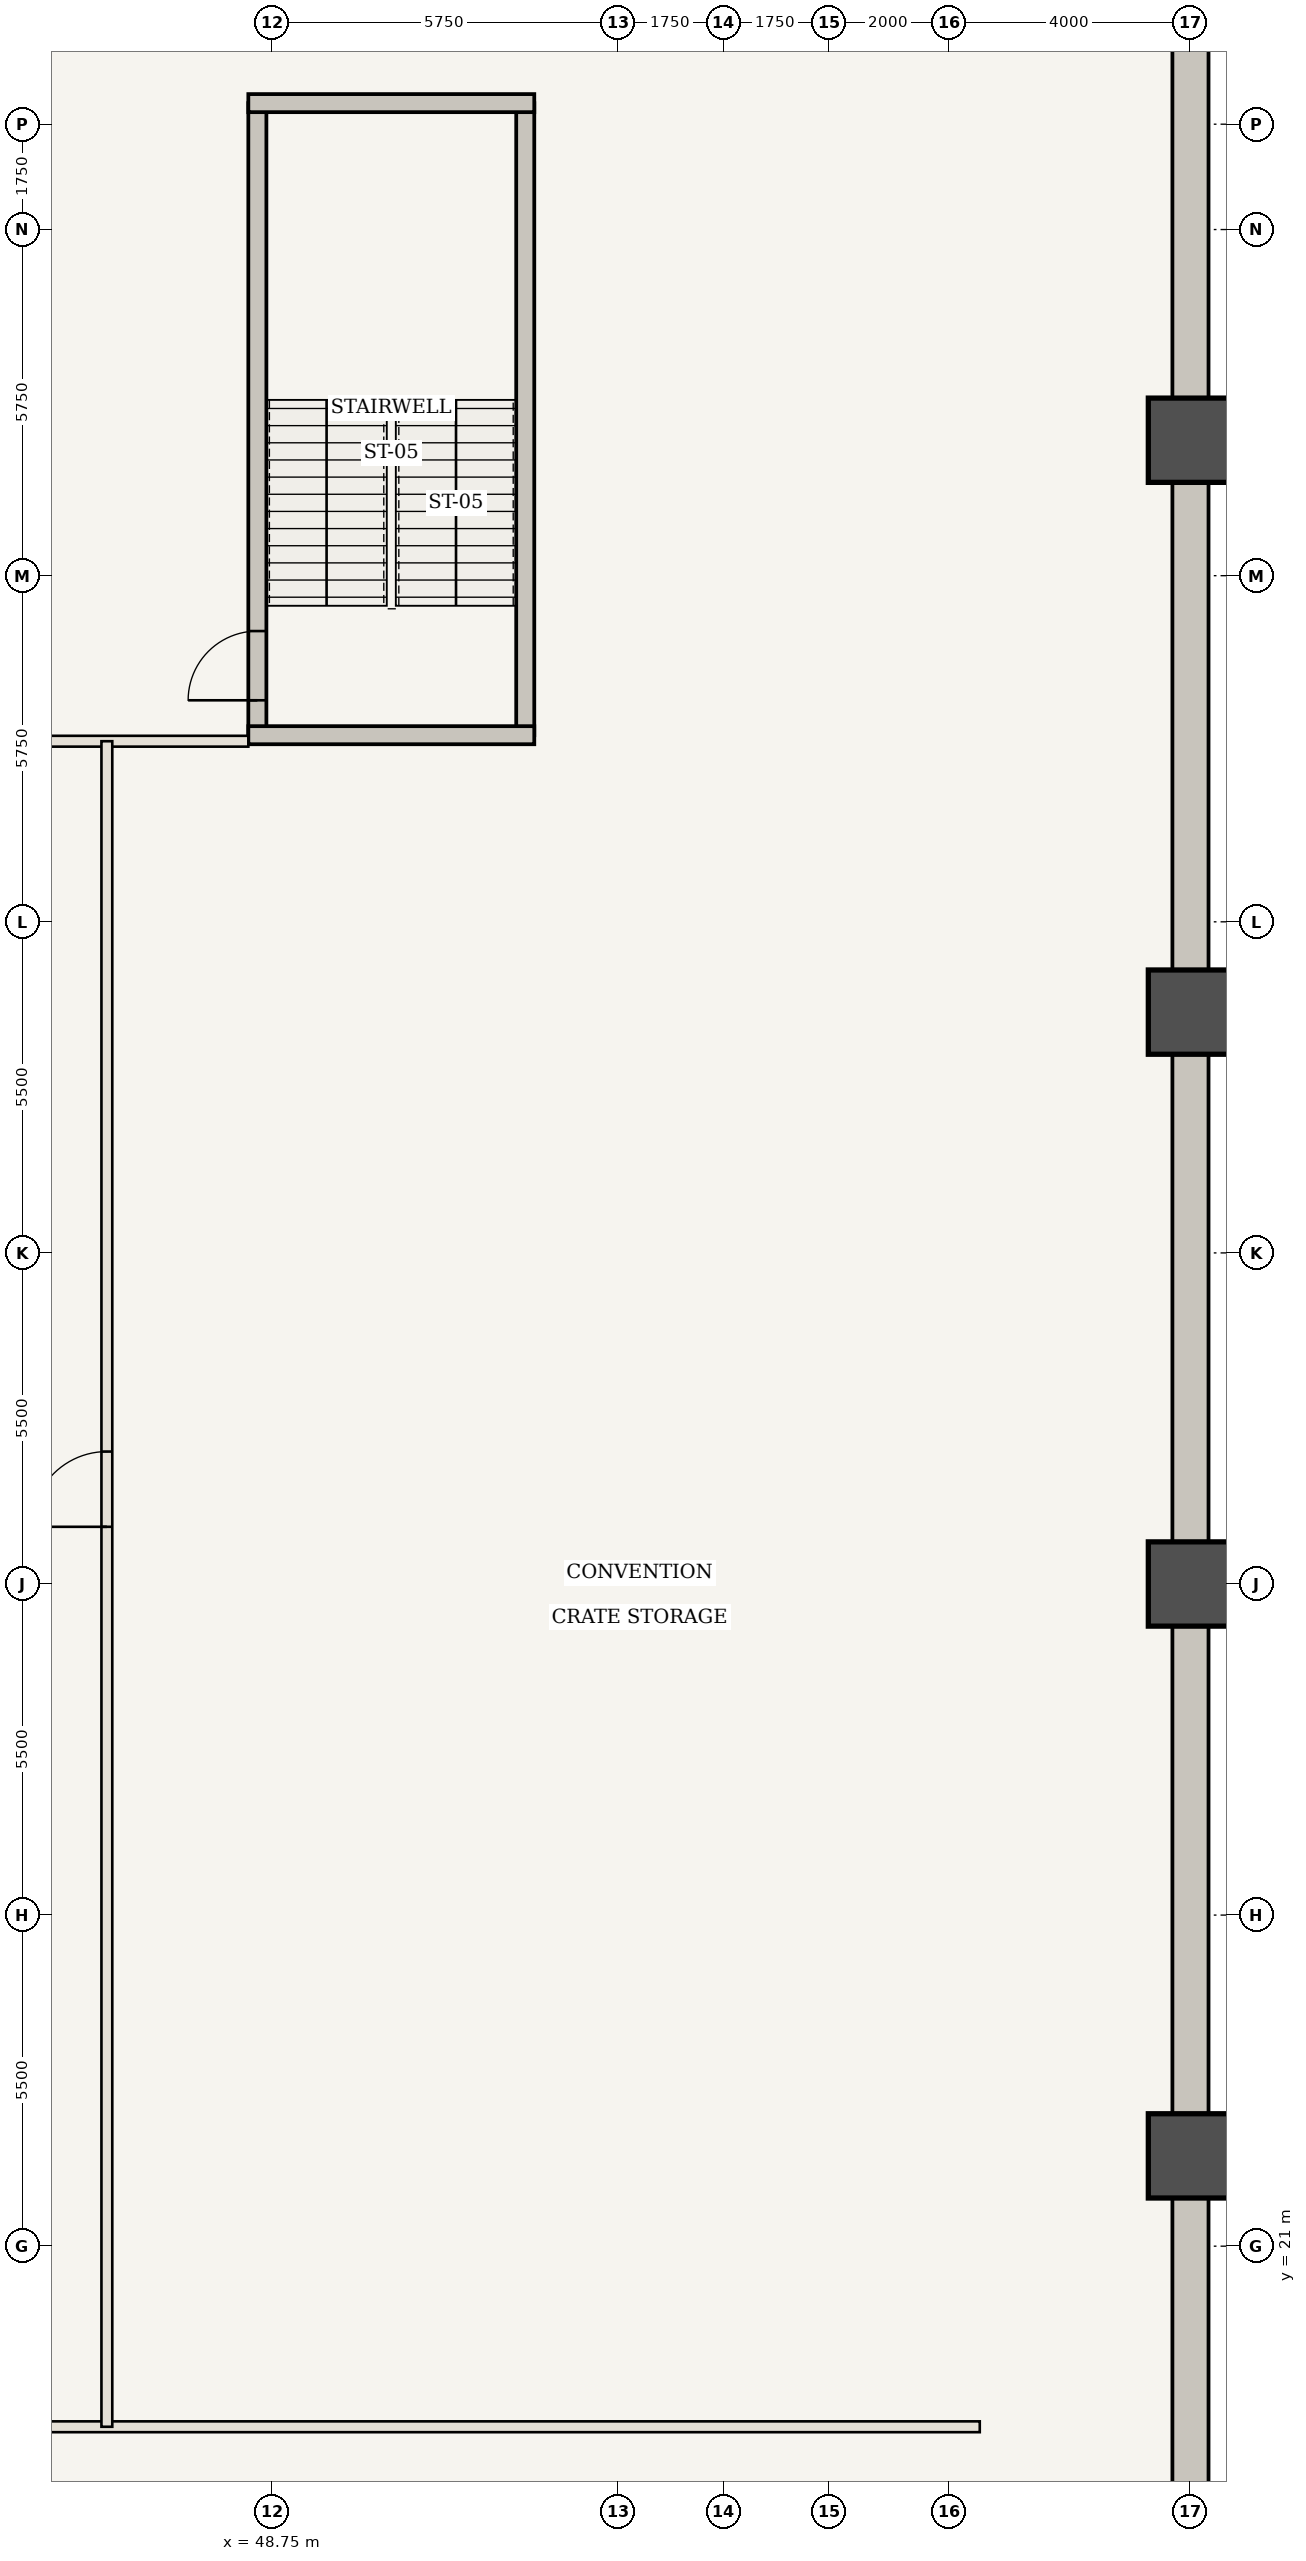
"""IFC4 building model, lengths in metres.
Left out: names, types, materials, properties, quantities, classifications, styles, units other than length and angle.
Written with IfcOpenShell. Run it as: python <this file> out.ifc"""

import sys

from ifc_helpers import new_model, si_unit, direction, frame, frame_2d, origin, origin_2d, place, context, subcontext, project, spatial, rectangle, extrude, element, fill, save


model = new_model("IFC4")
c1 = context("Model", 3, precision=1e-05, world=origin(), true_north=direction((0.0, 1.0)))
c2 = subcontext(c1, "Body", "Model", "MODEL_VIEW")
j1 = project(units=[si_unit("LENGTHUNIT", "METRE"), si_unit("PLANEANGLEUNIT", "RADIAN")], contexts=[c1])
p1 = place(None, origin())
s1 = spatial("IfcSite", under=j1, at=p1, CompositionType="ELEMENT")
p2 = place(p1, origin())
s2 = spatial("IfcBuilding", under=s1, at=p2, CompositionType="ELEMENT")
p3 = place(p2, frame((0.0, 0.0, -9.1)))
s3 = spatial("IfcBuildingStorey", under=s2, at=p3, CompositionType="ELEMENT", Elevation=-9.1)
p4 = place(p3, frame((64.0, 3.5, -0.6), z_axis=(0.0, 0.0, 1.0), x_axis=(0.0, 1.0, 0.0)))
e1 = element("IfcWall", 1, at=p4, inside=s3, PredefinedType="USERDEFINED", context=c2, shape_type="SweptSolid", body=[
    extrude(rectangle(XDim=57.0, YDim=0.6, at=frame_2d((28.5, 0.0))), origin(), (0.0, 0.0, 1.0), 5.15),
])
for number, where, z_axis, x_axis in (
    (2, (64.0, 22.5, -0.6), (0.0, 0.0, 1.0), (1.0, 0.0, 0.0)),
    (3, (64.0, 32.0, -0.6), (0.0, 0.0, 1.0), (1.0, 0.0, 0.0)),
    (4, (64.0, 41.5, -0.6), (0.0, 0.0, 1.0), (1.0, 0.0, 0.0)),
    (5, (64.0, 51.0, -0.6), (0.0, 0.0, 1.0), (1.0, 0.0, 0.0)),
):
    element("IfcColumn", number, at=place(p3, frame(where, z_axis=z_axis, x_axis=x_axis)), inside=s3, PredefinedType="COLUMN", context=c2, shape_type="SweptSolid", body=[
        extrude(rectangle(XDim=1.4, YDim=1.4, at=origin_2d()), origin(), (0.0, 0.0, 1.0), 5.15),
    ])
p5 = place(p3, frame((48.5, 46.1, 0.0), z_axis=(0.0, 0.0, 1.0), x_axis=(0.0, 1.0, 0.0)))
e6 = element("IfcWall", 6, at=p5, inside=s3, PredefinedType="SHEAR", context=c2, shape_type="SweptSolid", body=[
    extrude(rectangle(XDim=10.5, YDim=0.3, at=frame_2d((5.25, 0.0))), origin(), (0.0, 0.0, 1.0), 4.25),
])
p6 = place(p5, frame((0.58, 0.0, 0.0)))
e7 = element("IfcOpeningElement", 7, at=p6, cuts=e6, PredefinedType="OPENING", context=c2, shape_type="SweptSolid", body=[
    extrude(rectangle(XDim=1.15, YDim=2.15, at=frame_2d((0.575, 1.075))), frame((0.0, 0.16, 0.0), z_axis=(0.0, -1.0, 0.0), x_axis=(1.0, 0.0, 0.0)), (0.0, 0.0, 1.0), 0.32),
])
p7 = place(p3, frame((52.95, 46.1, 0.0), z_axis=(0.0, 0.0, 1.0), x_axis=(0.0, 1.0, 0.0)))
e8 = element("IfcWall", 8, at=p7, inside=s3, PredefinedType="SHEAR", context=c2, shape_type="SweptSolid", body=[
    extrude(rectangle(XDim=10.5, YDim=0.3, at=frame_2d((5.25, 0.0))), origin(), (0.0, 0.0, 1.0), 4.25),
])
for number, where, z_axis, x_axis in (
    (9, (48.35, 46.1, 0.0), (0.0, 0.0, 1.0), (1.0, 0.0, 0.0)),
    (10, (48.35, 56.6, 0.0), (0.0, 0.0, 1.0), (1.0, 0.0, 0.0)),
):
    element("IfcWall", number, at=place(p3, frame(where, z_axis=z_axis, x_axis=x_axis)), inside=s3, PredefinedType="SHEAR", context=c2, shape_type="SweptSolid", body=[
        extrude(rectangle(XDim=4.75, YDim=0.3, at=frame_2d((2.375, 0.0))), origin(), (0.0, 0.0, 1.0), 4.25),
    ])
p8 = place(p3, frame((38.0, 18.0, 0.0), z_axis=(0.0, 0.0, 1.0), x_axis=(1.0, 0.0, 0.0)))
e11 = element("IfcWall", 11, at=p8, inside=s3, PredefinedType="STANDARD", context=c2, shape_type="SweptSolid", body=[
    extrude(rectangle(XDim=22.5, YDim=0.18, at=frame_2d((11.25, 0.0))), origin(), (0.0, 0.0, 1.0), 4.25),
])
p9 = place(p8, frame((0.85, 0.0, 0.0)))
e12 = element("IfcOpeningElement", 12, at=p9, cuts=e11, PredefinedType="OPENING", context=c2, shape_type="SweptSolid", body=[
    extrude(rectangle(XDim=1.25, YDim=2.2, at=frame_2d((0.625, 1.1))), frame((0.0, 0.1, 0.0), z_axis=(0.0, -1.0, 0.0), x_axis=(1.0, 0.0, 0.0)), (0.0, 0.0, 1.0), 0.2),
])
p10 = place(p3, frame((26.0, 46.0, 0.0), z_axis=(0.0, 0.0, 1.0), x_axis=(1.0, 0.0, 0.0)))
e13 = element("IfcWall", 13, at=p10, inside=s3, PredefinedType="STANDARD", context=c2, shape_type="SweptSolid", body=[
    extrude(rectangle(XDim=22.35, YDim=0.18, at=frame_2d((11.175, 0.0))), origin(), (0.0, 0.0, 1.0), 4.25),
])
p11 = place(p10, frame((0.85, 0.0, 0.0)))
e14 = element("IfcOpeningElement", 14, at=p11, cuts=e13, PredefinedType="OPENING", context=c2, shape_type="SweptSolid", body=[
    extrude(rectangle(XDim=1.25, YDim=2.2, at=frame_2d((0.625, 1.1))), frame((0.0, 0.1, 0.0), z_axis=(0.0, -1.0, 0.0), x_axis=(1.0, 0.0, 0.0)), (0.0, 0.0, 1.0), 0.2),
])
p12 = place(p3, frame((46.0, 18.0, 0.0), z_axis=(0.0, 0.0, 1.0), x_axis=(0.0, 1.0, 0.0)))
e15 = element("IfcWall", 15, at=p12, inside=s3, PredefinedType="STANDARD", context=c2, shape_type="SweptSolid", body=[
    extrude(rectangle(XDim=28.0, YDim=0.18, at=frame_2d((14.0, 0.0))), origin(), (0.0, 0.0, 1.0), 4.25),
])
p13 = place(p12, frame((14.95, 0.0, 0.0)))
e16 = element("IfcOpeningElement", 16, at=p13, cuts=e15, PredefinedType="OPENING", context=c2, shape_type="SweptSolid", body=[
    extrude(rectangle(XDim=1.25, YDim=2.2, at=frame_2d((0.625, 1.1))), frame((0.0, 0.1, 0.0), z_axis=(0.0, -1.0, 0.0), x_axis=(1.0, 0.0, 0.0)), (0.0, 0.0, 1.0), 0.2),
])
p14 = place(p6, origin())
e17 = element("IfcDoor", 17, at=p14, inside=s3, OperationType="SINGLE_SWING_LEFT", PredefinedType="DOOR", context=c2, shape_type="SweptSolid", body=[
    extrude(rectangle(XDim=1.15, YDim=2.15, at=frame_2d((0.575, 1.075))), frame((0.0, 0.025, 0.0), z_axis=(0.0, -1.0, 0.0), x_axis=(1.0, 0.0, 0.0)), (0.0, 0.0, 1.0), 0.05),
])
fill(e7, e17)
p15 = place(p13, origin())
e18 = element("IfcDoor", 18, at=p15, inside=s3, OperationType="SINGLE_SWING_LEFT", PredefinedType="DOOR", context=c2, shape_type="SweptSolid", body=[
    extrude(rectangle(XDim=1.25, YDim=2.2, at=frame_2d((0.625, 1.1))), frame((0.0, 0.025, 0.0), z_axis=(0.0, -1.0, 0.0), x_axis=(1.0, 0.0, 0.0)), (0.0, 0.0, 1.0), 0.05),
])
fill(e16, e18)
save(model, sys.argv[1])
